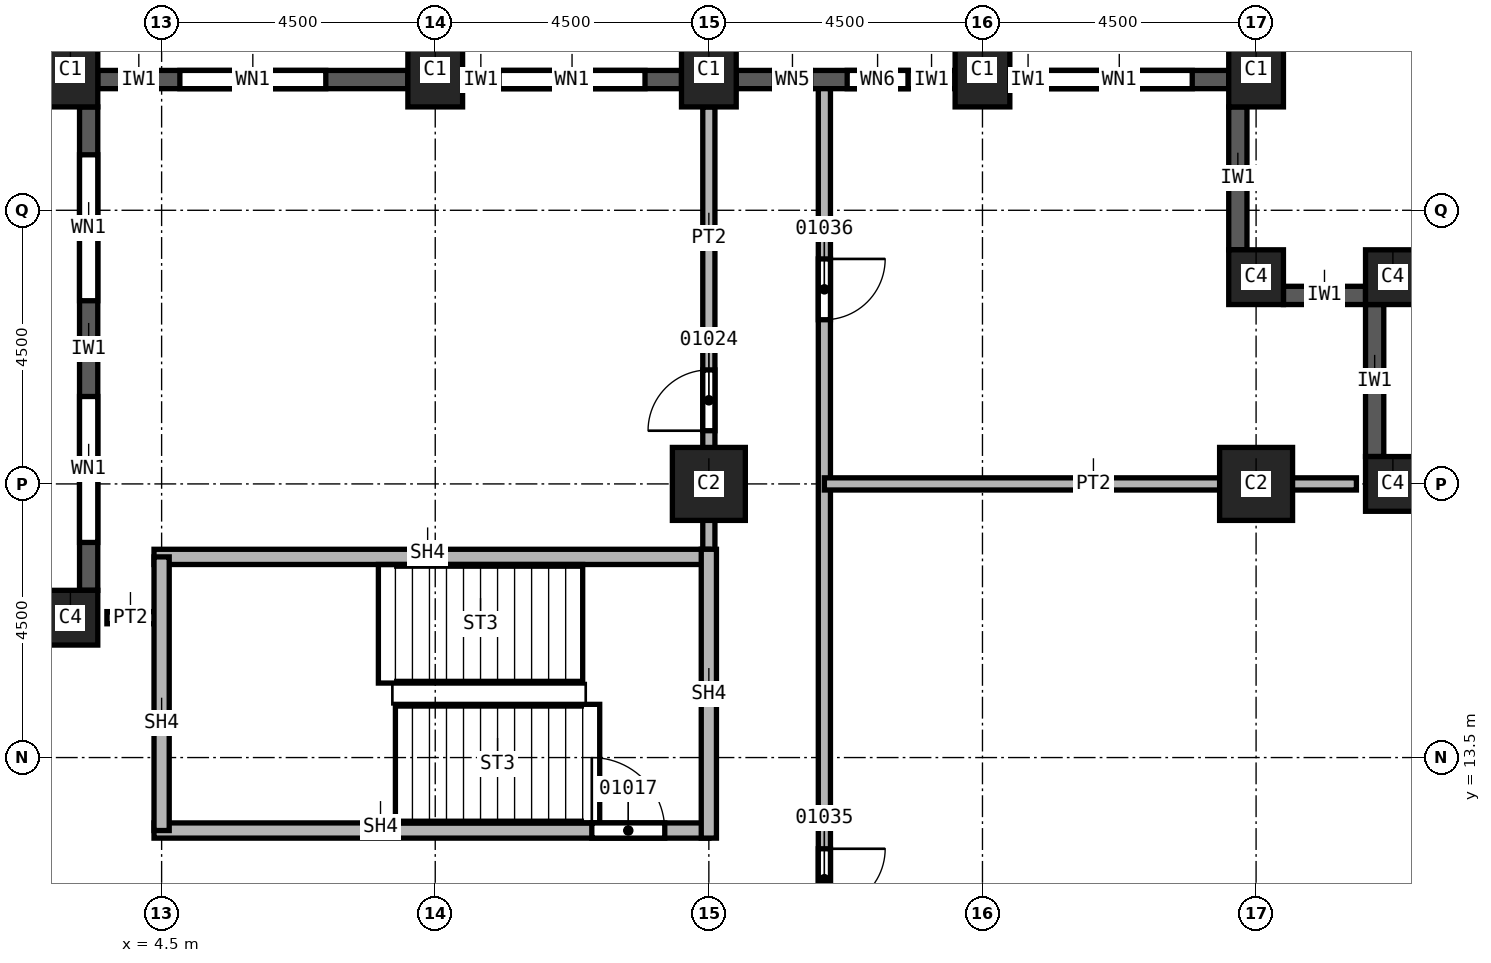
"""IFC4 building model, lengths in metres.
Left out: names, types, materials, properties, quantities, classifications, styles, units other than length and angle.
Written with IfcOpenShell. Run it as: python <this file> out.ifc"""

import sys

from ifc_helpers import new_model, si_unit, direction, frame, frame_2d, origin, origin_2d, place, context, subcontext, project, spatial, rectangle, extrude, element, fill, save


model = new_model("IFC4")
c1 = context("Model", 3, precision=1e-05, world=origin(), true_north=direction((0.0, 1.0)))
c2 = subcontext(c1, "Body", "Model", "MODEL_VIEW")
j1 = project(units=[si_unit("LENGTHUNIT", "METRE"), si_unit("PLANEANGLEUNIT", "RADIAN")], contexts=[c1])
p1 = place(None, origin())
s1 = spatial("IfcSite", under=j1, at=p1, CompositionType="ELEMENT")
p2 = place(p1, origin())
s2 = spatial("IfcBuilding", under=s1, at=p2, CompositionType="ELEMENT")
p3 = place(p2, frame((0.0, 0.0, 72.0)))
s3 = spatial("IfcBuildingStorey", under=s2, at=p3, CompositionType="ELEMENT", Elevation=72.0)
for number, where, z_axis, x_axis in (
    (1, (13.5, 18.0, 0.0), (0.0, 0.0, 1.0), (1.0, 0.0, 0.0)),
    (2, (22.5, 18.0, 0.0), (0.0, 0.0, 1.0), (1.0, 0.0, 0.0)),
):
    element("IfcColumn", number, at=place(p3, frame(where, z_axis=z_axis, x_axis=x_axis)), inside=s3, PredefinedType="COLUMN", context=c2, shape_type="SweptSolid", body=[
        extrude(rectangle(XDim=1.2, YDim=1.2, at=origin_2d()), origin(), (0.0, 0.0, 1.0), 3.7),
    ])
for number, where, z_axis, x_axis in (
    (3, (3.0, 24.8, 0.0), (0.0, 0.0, 1.0), (1.0, 0.0, 0.0)),
    (4, (9.0, 24.8, 0.0), (0.0, 0.0, 1.0), (1.0, 0.0, 0.0)),
    (5, (13.5, 24.8, 0.0), (0.0, 0.0, 1.0), (1.0, 0.0, 0.0)),
    (6, (18.0, 24.8, 0.0), (0.0, 0.0, 1.0), (1.0, 0.0, 0.0)),
    (7, (22.5, 24.8, 0.0), (0.0, 0.0, 1.0), (1.0, 0.0, 0.0)),
):
    element("IfcColumn", number, at=place(p3, frame(where, z_axis=z_axis, x_axis=x_axis)), inside=s3, PredefinedType="COLUMN", context=c2, shape_type="SweptSolid", body=[
        extrude(rectangle(XDim=0.9, YDim=1.2, at=origin_2d()), origin(), (0.0, 0.0, 1.0), 3.7),
    ])
for number, where, z_axis, x_axis in (
    (8, (3.0, 15.8, 0.0), (0.0, 0.0, 1.0), (1.0, 0.0, 0.0)),
    (9, (22.5, 21.4, 0.0), (0.0, 0.0, 1.0), (1.0, 0.0, 0.0)),
    (10, (24.75, 21.4, 0.0), (0.0, 0.0, 1.0), (1.0, 0.0, 0.0)),
    (11, (24.75, 18.0, 0.0), (0.0, 0.0, 1.0), (1.0, 0.0, 0.0)),
):
    element("IfcColumn", number, at=place(p3, frame(where, z_axis=z_axis, x_axis=x_axis)), inside=s3, PredefinedType="COLUMN", context=c2, shape_type="SweptSolid", body=[
        extrude(rectangle(XDim=0.9, YDim=0.9, at=origin_2d()), origin(), (0.0, 0.0, 1.0), 3.7),
    ])
p4 = place(p3, frame((24.45, 18.45, 0.0), z_axis=(0.0, 0.0, 1.0), x_axis=(0.0, 1.0, 0.0)))
e12 = element("IfcWall", 12, at=p4, inside=s3, PredefinedType="SOLIDWALL", context=c2, shape_type="SweptSolid", body=[
    extrude(rectangle(XDim=2.5, YDim=0.3, at=frame_2d((1.25, 0.0))), origin(), (0.0, 0.0, 1.0), 3.1),
])
p5 = place(p3, frame((24.3, 21.1, 0.0), z_axis=(0.0, 0.0, 1.0), x_axis=(-1.0, 0.0, 0.0)))
e13 = element("IfcWall", 13, at=p5, inside=s3, PredefinedType="SOLIDWALL", context=c2, shape_type="SweptSolid", body=[
    extrude(rectangle(XDim=1.35, YDim=0.3, at=frame_2d((0.675, 0.0))), origin(), (0.0, 0.0, 1.0), 3.1),
])
p6 = place(p3, frame((22.2, 21.85, 0.0), z_axis=(0.0, 0.0, 1.0), x_axis=(0.0, 1.0, 0.0)))
e14 = element("IfcWall", 14, at=p6, inside=s3, PredefinedType="SOLIDWALL", context=c2, shape_type="SweptSolid", body=[
    extrude(rectangle(XDim=2.35, YDim=0.3, at=frame_2d((1.175, 0.0))), origin(), (0.0, 0.0, 1.0), 3.1),
])
p7 = place(p3, frame((22.05, 24.65, 0.0), z_axis=(0.0, 0.0, 1.0), x_axis=(-1.0, 0.0, 0.0)))
e15 = element("IfcWall", 15, at=p7, inside=s3, PredefinedType="SOLIDWALL", context=c2, shape_type="SweptSolid", body=[
    extrude(rectangle(XDim=3.6, YDim=0.3, at=frame_2d((1.8, 0.0))), origin(), (0.0, 0.0, 1.0), 3.1),
])
p8 = place(p7, frame((0.6, 0.0, 0.8)))
e16 = element("IfcOpeningElement", 16, at=p8, cuts=e15, PredefinedType="OPENING", context=c2, shape_type="SweptSolid", body=[
    extrude(rectangle(XDim=2.4, YDim=1.95, at=frame_2d((1.2, 0.975))), frame((0.0, 0.15, 0.0), z_axis=(0.0, -1.0, 0.0), x_axis=(1.0, 0.0, 0.0)), (0.0, 0.0, 1.0), 0.3),
])
p9 = place(p3, frame((17.55, 24.65, 0.0), z_axis=(0.0, 0.0, 1.0), x_axis=(-1.0, 0.0, 0.0)))
e17 = element("IfcWall", 17, at=p9, inside=s3, PredefinedType="SOLIDWALL", context=c2, shape_type="SweptSolid", body=[
    extrude(rectangle(XDim=3.6, YDim=0.3, at=frame_2d((1.8, 0.0))), origin(), (0.0, 0.0, 1.0), 3.1),
])
p10 = place(p9, frame((0.775, 0.0, 0.8)))
e18 = element("IfcOpeningElement", 18, at=p10, cuts=e17, PredefinedType="OPENING", context=c2, shape_type="SweptSolid", body=[
    extrude(rectangle(XDim=1.0, YDim=1.95, at=frame_2d((0.5, 0.975))), frame((0.0, 0.15, 0.0), z_axis=(0.0, -1.0, 0.0), x_axis=(1.0, 0.0, 0.0)), (0.0, 0.0, 1.0), 0.3),
])
p11 = place(p9, frame((2.375, 0.0, 0.8)))
e19 = element("IfcOpeningElement", 19, at=p11, cuts=e17, PredefinedType="OPENING", context=c2, shape_type="SweptSolid", body=[
    extrude(rectangle(XDim=0.6, YDim=1.95, at=frame_2d((0.3, 0.975))), frame((0.0, 0.15, 0.0), z_axis=(0.0, -1.0, 0.0), x_axis=(1.0, 0.0, 0.0)), (0.0, 0.0, 1.0), 0.3),
])
p12 = place(p3, frame((13.05, 24.65, 0.0), z_axis=(0.0, 0.0, 1.0), x_axis=(-1.0, 0.0, 0.0)))
e20 = element("IfcWall", 20, at=p12, inside=s3, PredefinedType="SOLIDWALL", context=c2, shape_type="SweptSolid", body=[
    extrude(rectangle(XDim=3.6, YDim=0.3, at=frame_2d((1.8, 0.0))), origin(), (0.0, 0.0, 1.0), 3.1),
])
p13 = place(p12, frame((0.6, 0.0, 0.8)))
e21 = element("IfcOpeningElement", 21, at=p13, cuts=e20, PredefinedType="OPENING", context=c2, shape_type="SweptSolid", body=[
    extrude(rectangle(XDim=2.4, YDim=1.95, at=frame_2d((1.2, 0.975))), frame((0.0, 0.15, 0.0), z_axis=(0.0, -1.0, 0.0), x_axis=(1.0, 0.0, 0.0)), (0.0, 0.0, 1.0), 0.3),
])
p14 = place(p3, frame((8.55, 24.65, 0.0), z_axis=(0.0, 0.0, 1.0), x_axis=(-1.0, 0.0, 0.0)))
e22 = element("IfcWall", 22, at=p14, inside=s3, PredefinedType="SOLIDWALL", context=c2, shape_type="SweptSolid", body=[
    extrude(rectangle(XDim=5.1, YDim=0.3, at=frame_2d((2.55, 0.0))), origin(), (0.0, 0.0, 1.0), 3.1),
])
p15 = place(p14, frame((1.35, 0.0, 0.8)))
e23 = element("IfcOpeningElement", 23, at=p15, cuts=e22, PredefinedType="OPENING", context=c2, shape_type="SweptSolid", body=[
    extrude(rectangle(XDim=2.4, YDim=1.95, at=frame_2d((1.2, 0.975))), frame((0.0, 0.15, 0.0), z_axis=(0.0, -1.0, 0.0), x_axis=(1.0, 0.0, 0.0)), (0.0, 0.0, 1.0), 0.3),
])
p16 = place(p3, frame((3.3, 24.2, 0.0), z_axis=(0.0, 0.0, 1.0), x_axis=(0.0, -1.0, 0.0)))
e24 = element("IfcWall", 24, at=p16, inside=s3, PredefinedType="SOLIDWALL", context=c2, shape_type="SweptSolid", body=[
    extrude(rectangle(XDim=7.95, YDim=0.3, at=frame_2d((3.975, 0.0))), origin(), (0.0, 0.0, 1.0), 3.1),
])
p17 = place(p16, frame((0.788, 0.0, 0.8)))
e25 = element("IfcOpeningElement", 25, at=p17, cuts=e24, PredefinedType="OPENING", context=c2, shape_type="SweptSolid", body=[
    extrude(rectangle(XDim=2.4, YDim=1.95, at=frame_2d((1.2, 0.975))), frame((0.0, 0.15, 0.0), z_axis=(0.0, -1.0, 0.0), x_axis=(1.0, 0.0, 0.0)), (0.0, 0.0, 1.0), 0.3),
])
p18 = place(p16, frame((4.762, 0.0, 0.8)))
e26 = element("IfcOpeningElement", 26, at=p18, cuts=e24, PredefinedType="OPENING", context=c2, shape_type="SweptSolid", body=[
    extrude(rectangle(XDim=2.4, YDim=1.95, at=frame_2d((1.2, 0.975))), frame((0.0, 0.15, 0.0), z_axis=(0.0, -1.0, 0.0), x_axis=(1.0, 0.0, 0.0)), (0.0, 0.0, 1.0), 0.3),
])
p19 = place(p3, frame((3.6, 15.8, 0.0), z_axis=(0.0, 0.0, 1.0), x_axis=(1.0, 0.0, 0.0)))
e27 = element("IfcWall", 27, at=p19, inside=s3, PredefinedType="PARTITIONING", context=c2, shape_type="SweptSolid", body=[
    extrude(rectangle(XDim=0.9, YDim=0.2, at=frame_2d((0.45, 0.0))), origin(), (0.0, 0.0, 1.0), 3.7),
])
p20 = place(p3, frame((13.5, 16.675, 0.0), z_axis=(0.0, 0.0, 1.0), x_axis=(0.0, 1.0, 0.0)))
e28 = element("IfcWall", 28, at=p20, inside=s3, PredefinedType="PARTITIONING", context=c2, shape_type="SweptSolid", body=[
    extrude(rectangle(XDim=7.525, YDim=0.2, at=frame_2d((3.762, 0.0))), origin(), (0.0, 0.0, 1.0), 3.7),
])
p21 = place(p20, frame((2.2, 0.0, 0.0)))
e29 = element("IfcOpeningElement", 29, at=p21, cuts=e28, PredefinedType="OPENING", context=c2, shape_type="SweptSolid", body=[
    extrude(rectangle(XDim=1.0, YDim=2.1, at=frame_2d((0.5, 1.05))), frame((0.0, 0.1, 0.0), z_axis=(0.0, -1.0, 0.0), x_axis=(1.0, 0.0, 0.0)), (0.0, 0.0, 1.0), 0.2),
])
p22 = place(p3, frame((15.4, 24.5, 0.0), z_axis=(0.0, 0.0, 1.0), x_axis=(0.0, -1.0, 0.0)))
e30 = element("IfcWall", 30, at=p22, inside=s3, PredefinedType="PARTITIONING", context=c2, shape_type="SweptSolid", body=[
    extrude(rectangle(XDim=25.35, YDim=0.2, at=frame_2d((12.675, 0.0))), origin(), (0.0, 0.0, 1.0), 3.7),
])
p23 = place(p22, frame((23.75, 0.0, 0.0)))
e31 = element("IfcOpeningElement", 31, at=p23, cuts=e30, PredefinedType="OPENING", context=c2, shape_type="SweptSolid", body=[
    extrude(rectangle(XDim=1.0, YDim=2.1, at=frame_2d((0.5, 1.05))), frame((0.0, 0.1, 0.0), z_axis=(0.0, -1.0, 0.0), x_axis=(1.0, 0.0, 0.0)), (0.0, 0.0, 1.0), 0.2),
])
p24 = place(p22, frame((12.5, 0.0, 0.0)))
e32 = element("IfcOpeningElement", 32, at=p24, cuts=e30, PredefinedType="OPENING", context=c2, shape_type="SweptSolid", body=[
    extrude(rectangle(XDim=1.0, YDim=2.1, at=frame_2d((0.5, 1.05))), frame((0.0, 0.1, 0.0), z_axis=(0.0, -1.0, 0.0), x_axis=(1.0, 0.0, 0.0)), (0.0, 0.0, 1.0), 0.2),
])
p25 = place(p22, frame((2.8, 0.0, 0.0)))
e33 = element("IfcOpeningElement", 33, at=p25, cuts=e30, PredefinedType="OPENING", context=c2, shape_type="SweptSolid", body=[
    extrude(rectangle(XDim=1.0, YDim=2.1, at=frame_2d((0.5, 1.05))), frame((0.0, 0.1, 0.0), z_axis=(0.0, -1.0, 0.0), x_axis=(1.0, 0.0, 0.0)), (0.0, 0.0, 1.0), 0.2),
])
p26 = place(p3, frame((15.4, 18.0, 0.0), z_axis=(0.0, 0.0, 1.0), x_axis=(1.0, 0.0, 0.0)))
e34 = element("IfcWall", 34, at=p26, inside=s3, PredefinedType="PARTITIONING", context=c2, shape_type="SweptSolid", body=[
    extrude(rectangle(XDim=8.75, YDim=0.2, at=frame_2d((4.375, 0.0))), origin(), (0.0, 0.0, 1.0), 3.7),
])
p27 = place(p3, frame((4.375, 12.3, 0.0), z_axis=(0.0, 0.0, 1.0), x_axis=(1.0, 0.0, 0.0)))
e35 = element("IfcWall", 35, at=p27, inside=s3, PredefinedType="SOLIDWALL", context=c2, shape_type="SweptSolid", body=[
    extrude(rectangle(XDim=9.125, YDim=0.25, at=frame_2d((4.562, 0.0))), origin(), (0.0, 0.0, 1.0), 3.7),
])
p28 = place(p27, frame((7.2, 0.0, 0.0)))
e36 = element("IfcOpeningElement", 36, at=p28, cuts=e35, PredefinedType="OPENING", context=c2, shape_type="SweptSolid", body=[
    extrude(rectangle(XDim=1.2, YDim=2.1, at=frame_2d((0.6, 1.05))), frame((0.0, 0.125, 0.0), z_axis=(0.0, -1.0, 0.0), x_axis=(1.0, 0.0, 0.0)), (0.0, 0.0, 1.0), 0.25),
])
p29 = place(p3, frame((4.375, 16.8, 0.0), z_axis=(0.0, 0.0, 1.0), x_axis=(1.0, 0.0, 0.0)))
e37 = element("IfcWall", 37, at=p29, inside=s3, PredefinedType="SOLIDWALL", context=c2, shape_type="SweptSolid", body=[
    extrude(rectangle(XDim=9.125, YDim=0.25, at=frame_2d((4.562, 0.0))), origin(), (0.0, 0.0, 1.0), 3.7),
])
p30 = place(p3, frame((4.5, 12.3, 0.0), z_axis=(0.0, 0.0, 1.0), x_axis=(0.0, 1.0, 0.0)))
e38 = element("IfcWall", 38, at=p30, inside=s3, PredefinedType="SOLIDWALL", context=c2, shape_type="SweptSolid", body=[
    extrude(rectangle(XDim=4.5, YDim=0.25, at=frame_2d((2.25, 0.0))), origin(), (0.0, 0.0, 1.0), 3.7),
])
p31 = place(p3, frame((13.5, 12.175, 0.0), z_axis=(0.0, 0.0, 1.0), x_axis=(0.0, 1.0, 0.0)))
e39 = element("IfcWall", 39, at=p31, inside=s3, PredefinedType="SOLIDWALL", context=c2, shape_type="SweptSolid", body=[
    extrude(rectangle(XDim=4.75, YDim=0.25, at=frame_2d((2.375, 0.0))), origin(), (0.0, 0.0, 1.0), 3.7),
])
p32 = place(p8, origin())
e40 = element("IfcWindow", 40, at=p32, inside=s3, PartitioningType="SINGLE_PANEL", PredefinedType="WINDOW", context=c2, shape_type="SweptSolid", body=[
    extrude(rectangle(XDim=2.4, YDim=1.95, at=frame_2d((1.2, 0.975))), frame((0.0, 0.03, 0.0), z_axis=(0.0, -1.0, 0.0), x_axis=(1.0, 0.0, 0.0)), (0.0, 0.0, 1.0), 0.06),
])
fill(e16, e40)
p33 = place(p13, origin())
e41 = element("IfcWindow", 41, at=p33, inside=s3, PartitioningType="SINGLE_PANEL", PredefinedType="WINDOW", context=c2, shape_type="SweptSolid", body=[
    extrude(rectangle(XDim=2.4, YDim=1.95, at=frame_2d((1.2, 0.975))), frame((0.0, 0.03, 0.0), z_axis=(0.0, -1.0, 0.0), x_axis=(1.0, 0.0, 0.0)), (0.0, 0.0, 1.0), 0.06),
])
fill(e21, e41)
p34 = place(p15, origin())
e42 = element("IfcWindow", 42, at=p34, inside=s3, PartitioningType="SINGLE_PANEL", PredefinedType="WINDOW", context=c2, shape_type="SweptSolid", body=[
    extrude(rectangle(XDim=2.4, YDim=1.95, at=frame_2d((1.2, 0.975))), frame((0.0, 0.03, 0.0), z_axis=(0.0, -1.0, 0.0), x_axis=(1.0, 0.0, 0.0)), (0.0, 0.0, 1.0), 0.06),
])
fill(e23, e42)
p35 = place(p17, origin())
e43 = element("IfcWindow", 43, at=p35, inside=s3, PartitioningType="SINGLE_PANEL", PredefinedType="WINDOW", context=c2, shape_type="SweptSolid", body=[
    extrude(rectangle(XDim=2.4, YDim=1.95, at=frame_2d((1.2, 0.975))), frame((0.0, 0.03, 0.0), z_axis=(0.0, -1.0, 0.0), x_axis=(1.0, 0.0, 0.0)), (0.0, 0.0, 1.0), 0.06),
])
fill(e25, e43)
p36 = place(p18, origin())
e44 = element("IfcWindow", 44, at=p36, inside=s3, PartitioningType="SINGLE_PANEL", PredefinedType="WINDOW", context=c2, shape_type="SweptSolid", body=[
    extrude(rectangle(XDim=2.4, YDim=1.95, at=frame_2d((1.2, 0.975))), frame((0.0, 0.03, 0.0), z_axis=(0.0, -1.0, 0.0), x_axis=(1.0, 0.0, 0.0)), (0.0, 0.0, 1.0), 0.06),
])
fill(e26, e44)
p37 = place(p28, origin())
e45 = element("IfcDoor", 45, at=p37, inside=s3, OperationType="SINGLE_SWING_RIGHT", PredefinedType="DOOR", context=c2, shape_type="SweptSolid", body=[
    extrude(rectangle(XDim=1.2, YDim=2.1, at=frame_2d((0.6, 1.05))), frame((0.0, 0.025, 0.0), z_axis=(0.0, -1.0, 0.0), x_axis=(1.0, 0.0, 0.0)), (0.0, 0.0, 1.0), 0.05),
])
fill(e36, e45)
p38 = place(p21, origin())
e46 = element("IfcDoor", 46, at=p38, inside=s3, OperationType="SINGLE_SWING_LEFT", PredefinedType="DOOR", context=c2, shape_type="SweptSolid", body=[
    extrude(rectangle(XDim=1.0, YDim=2.1, at=frame_2d((0.5, 1.05))), frame((0.0, 0.025, 0.0), z_axis=(0.0, -1.0, 0.0), x_axis=(1.0, 0.0, 0.0)), (0.0, 0.0, 1.0), 0.05),
])
fill(e29, e46)
p39 = place(p24, origin())
e47 = element("IfcDoor", 47, at=p39, inside=s3, OperationType="SINGLE_SWING_RIGHT", PredefinedType="DOOR", context=c2, shape_type="SweptSolid", body=[
    extrude(rectangle(XDim=1.0, YDim=2.1, at=frame_2d((0.5, 1.05))), frame((0.0, 0.025, 0.0), z_axis=(0.0, -1.0, 0.0), x_axis=(1.0, 0.0, 0.0)), (0.0, 0.0, 1.0), 0.05),
])
fill(e32, e47)
p40 = place(p25, origin())
e48 = element("IfcDoor", 48, at=p40, inside=s3, OperationType="SINGLE_SWING_LEFT", PredefinedType="DOOR", context=c2, shape_type="SweptSolid", body=[
    extrude(rectangle(XDim=1.0, YDim=2.1, at=frame_2d((0.5, 1.05))), frame((0.0, 0.025, 0.0), z_axis=(0.0, -1.0, 0.0), x_axis=(1.0, 0.0, 0.0)), (0.0, 0.0, 1.0), 0.05),
])
fill(e33, e48)
p41 = place(p10, origin())
e49 = element("IfcWindow", 49, at=p41, inside=s3, PartitioningType="SINGLE_PANEL", PredefinedType="WINDOW", context=c2, shape_type="SweptSolid", body=[
    extrude(rectangle(XDim=1.0, YDim=1.95, at=frame_2d((0.5, 0.975))), frame((0.0, 0.03, 0.0), z_axis=(0.0, -1.0, 0.0), x_axis=(1.0, 0.0, 0.0)), (0.0, 0.0, 1.0), 0.06),
])
fill(e18, e49)
p42 = place(p11, origin())
e50 = element("IfcWindow", 50, at=p42, inside=s3, PartitioningType="SINGLE_PANEL", PredefinedType="WINDOW", context=c2, shape_type="SweptSolid", body=[
    extrude(rectangle(XDim=0.6, YDim=1.95, at=frame_2d((0.3, 0.975))), frame((0.0, 0.03, 0.0), z_axis=(0.0, -1.0, 0.0), x_axis=(1.0, 0.0, 0.0)), (0.0, 0.0, 1.0), 0.06),
])
fill(e19, e50)
save(model, sys.argv[1])
